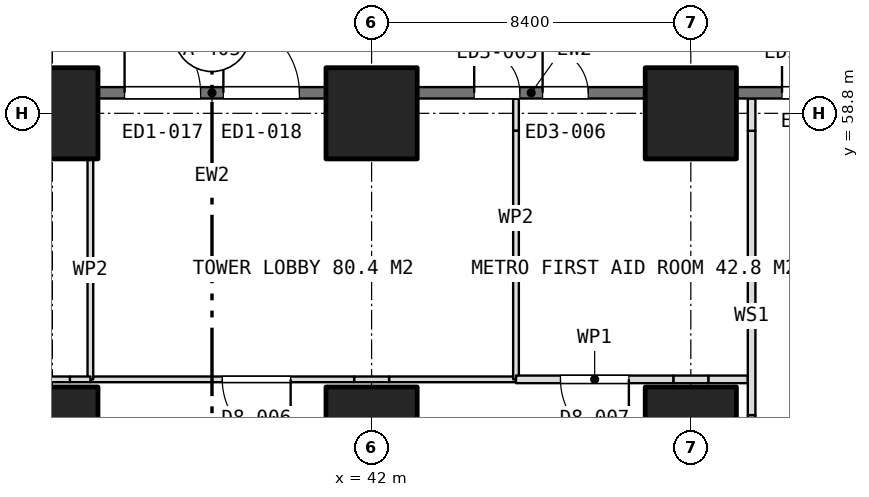
"""IFC4 building model, lengths in metres.
Left out: names, types, materials, properties, quantities, classifications, styles, units other than length and angle.
Written with IfcOpenShell. Run it as: python <this file> out.ifc"""

import sys

from ifc_helpers import new_model, si_unit, direction, frame, frame_2d, origin, origin_2d, place, context, subcontext, project, spatial, rectangle, extrude, element, fill, save


model = new_model("IFC4")
c1 = context("Model", 3, precision=1e-05, world=origin(), true_north=direction((0.0, 1.0)))
c2 = subcontext(c1, "Body", "Model", "MODEL_VIEW")
j1 = project(units=[si_unit("LENGTHUNIT", "METRE"), si_unit("PLANEANGLEUNIT", "RADIAN")], contexts=[c1])
p1 = place(None, origin())
s1 = spatial("IfcSite", under=j1, at=p1, CompositionType="ELEMENT")
p2 = place(p1, origin())
s2 = spatial("IfcBuilding", under=s1, at=p2, CompositionType="ELEMENT")
p3 = place(p2, origin())
s3 = spatial("IfcBuildingStorey", under=s2, at=p3, CompositionType="ELEMENT", Elevation=0.0)
for number, where, z_axis, x_axis in (
    (1, (33.6, 50.4, 0.0), (0.0, 0.0, 1.0), (1.0, 0.0, 0.0)),
    (2, (33.6, 58.8, 0.0), (0.0, 0.0, 1.0), (1.0, 0.0, 0.0)),
    (3, (42.0, 50.4, 0.0), (0.0, 0.0, 1.0), (1.0, 0.0, 0.0)),
    (4, (42.0, 58.8, 0.0), (0.0, 0.0, 1.0), (1.0, 0.0, 0.0)),
    (5, (50.4, 50.4, 0.0), (0.0, 0.0, 1.0), (1.0, 0.0, 0.0)),
    (6, (50.4, 58.8, 0.0), (0.0, 0.0, 1.0), (1.0, 0.0, 0.0)),
):
    element("IfcColumn", number, at=place(p3, frame(where, z_axis=z_axis, x_axis=x_axis)), inside=s3, PredefinedType="COLUMN", context=c2, shape_type="SweptSolid", body=[
        extrude(rectangle(XDim=2.4, YDim=2.4, at=origin_2d()), origin(), (0.0, 0.0, 1.0), 5.4),
    ])
p4 = place(p3, frame((51.601, 59.34, 0.0), z_axis=(0.0, 0.0, 1.0), x_axis=(1.0, 0.0, 0.0)))
e7 = element("IfcWall", 7, at=p4, inside=s3, PredefinedType="SOLIDWALL", context=c2, shape_type="SweptSolid", body=[
    extrude(rectangle(XDim=4.799, YDim=0.3, at=frame_2d((2.399, 0.0))), origin(), (0.0, 0.0, 1.0), 3.3),
])
p5 = place(p4, frame((2.999, 0.0, 0.0)))
e8 = element("IfcOpeningElement", 8, at=p5, cuts=e7, PredefinedType="OPENING", context=c2, shape_type="SweptSolid", body=[
    extrude(rectangle(XDim=1.2, YDim=2.4, at=frame_2d((0.6, 1.2))), frame((0.0, 0.16, 0.0), z_axis=(0.0, -1.0, 0.0), x_axis=(1.0, 0.0, 0.0)), (0.0, 0.0, 1.0), 0.32),
])
p6 = place(p4, frame((1.199, 0.0, 0.0)))
e9 = element("IfcOpeningElement", 9, at=p6, cuts=e7, PredefinedType="OPENING", context=c2, shape_type="SweptSolid", body=[
    extrude(rectangle(XDim=1.2, YDim=2.4, at=frame_2d((0.6, 1.2))), frame((0.0, 0.16, 0.0), z_axis=(0.0, -1.0, 0.0), x_axis=(1.0, 0.0, 0.0)), (0.0, 0.0, 1.0), 0.32),
])
p7 = place(p3, frame((43.201, 59.34, 0.0), z_axis=(0.0, 0.0, 1.0), x_axis=(1.0, 0.0, 0.0)))
e10 = element("IfcWall", 10, at=p7, inside=s3, PredefinedType="SOLIDWALL", context=c2, shape_type="SweptSolid", body=[
    extrude(rectangle(XDim=5.998, YDim=0.3, at=frame_2d((2.999, 0.0))), origin(), (0.0, 0.0, 1.0), 3.3),
])
p8 = place(p7, frame((3.299, 0.0, 0.0)))
e11 = element("IfcOpeningElement", 11, at=p8, cuts=e10, PredefinedType="OPENING", context=c2, shape_type="SweptSolid", body=[
    extrude(rectangle(XDim=1.2, YDim=2.4, at=frame_2d((0.6, 1.2))), frame((0.0, 0.16, 0.0), z_axis=(0.0, -1.0, 0.0), x_axis=(1.0, 0.0, 0.0)), (0.0, 0.0, 1.0), 0.32),
])
p9 = place(p7, frame((1.499, 0.0, 0.0)))
e12 = element("IfcOpeningElement", 12, at=p9, cuts=e10, PredefinedType="OPENING", context=c2, shape_type="SweptSolid", body=[
    extrude(rectangle(XDim=1.2, YDim=2.4, at=frame_2d((0.6, 1.2))), frame((0.0, 0.16, 0.0), z_axis=(0.0, -1.0, 0.0), x_axis=(1.0, 0.0, 0.0)), (0.0, 0.0, 1.0), 0.32),
])
p10 = place(p3, frame((34.801, 59.34, 0.0), z_axis=(0.0, 0.0, 1.0), x_axis=(1.0, 0.0, 0.0)))
e13 = element("IfcWall", 13, at=p10, inside=s3, PredefinedType="SOLIDWALL", context=c2, shape_type="SweptSolid", body=[
    extrude(rectangle(XDim=5.998, YDim=0.3, at=frame_2d((2.999, 0.0))), origin(), (0.0, 0.0, 1.0), 3.3),
])
p11 = place(p10, frame((3.299, 0.0, 0.0)))
e14 = element("IfcOpeningElement", 14, at=p11, cuts=e13, PredefinedType="OPENING", context=c2, shape_type="SweptSolid", body=[
    extrude(rectangle(XDim=2.0, YDim=2.7, at=frame_2d((1.0, 1.35))), frame((0.0, 0.16, 0.0), z_axis=(0.0, -1.0, 0.0), x_axis=(1.0, 0.0, 0.0)), (0.0, 0.0, 1.0), 0.32),
])
p12 = place(p10, frame((0.699, 0.0, 0.0)))
e15 = element("IfcOpeningElement", 15, at=p12, cuts=e13, PredefinedType="OPENING", context=c2, shape_type="SweptSolid", body=[
    extrude(rectangle(XDim=2.0, YDim=2.7, at=frame_2d((1.0, 1.35))), frame((0.0, 0.16, 0.0), z_axis=(0.0, -1.0, 0.0), x_axis=(1.0, 0.0, 0.0)), (0.0, 0.0, 1.0), 0.32),
])
p13 = place(p3, frame((52.0, 49.94, 0.0), z_axis=(0.0, 0.0, 1.0), x_axis=(0.0, 1.0, 0.0)))
e16 = element("IfcWall", 16, at=p13, inside=s3, PredefinedType="PARTITIONING", context=c2, shape_type="SweptSolid", body=[
    extrude(rectangle(XDim=0.92, YDim=0.2, at=frame_2d((0.46, 0.0))), origin(), (0.0, 0.0, 1.0), 3.3),
])
p14 = place(p3, frame((52.0, 50.86, 0.0), z_axis=(0.0, 0.0, 1.0), x_axis=(0.0, 1.0, 0.0)))
e17 = element("IfcWall", 17, at=p14, inside=s3, PredefinedType="PARTITIONING", context=c2, shape_type="SweptSolid", body=[
    extrude(rectangle(XDim=7.48, YDim=0.2, at=frame_2d((3.74, 0.0))), origin(), (0.0, 0.0, 1.0), 5.1),
])
p15 = place(p3, frame((52.0, 58.34, 0.0), z_axis=(0.0, 0.0, 1.0), x_axis=(0.0, 1.0, 0.0)))
e18 = element("IfcWall", 18, at=p15, inside=s3, PredefinedType="PARTITIONING", context=c2, shape_type="SweptSolid", body=[
    extrude(rectangle(XDim=0.85, YDim=0.2, at=frame_2d((0.425, 0.0))), origin(), (0.0, 0.0, 1.0), 3.3),
])
p16 = place(p3, frame((45.8, 51.8, 0.0), z_axis=(0.0, 0.0, 1.0), x_axis=(-1.0, 0.0, 0.0)))
e19 = element("IfcWall", 19, at=p16, inside=s3, PredefinedType="PARTITIONING", context=c2, shape_type="SweptSolid", body=[
    extrude(rectangle(XDim=3.34, YDim=0.15, at=frame_2d((1.67, 0.0))), origin(), (0.0, 0.0, 1.0), 5.1),
])
p17 = place(p3, frame((42.46, 51.8, 0.0), z_axis=(0.0, 0.0, 1.0), x_axis=(-1.0, 0.0, 0.0)))
e20 = element("IfcWall", 20, at=p17, inside=s3, PredefinedType="PARTITIONING", context=c2, shape_type="SweptSolid", body=[
    extrude(rectangle(XDim=0.92, YDim=0.15, at=frame_2d((0.46, 0.0))), origin(), (0.0, 0.0, 1.0), 3.3),
])
p18 = place(p3, frame((41.54, 51.8, 0.0), z_axis=(0.0, 0.0, 1.0), x_axis=(-1.0, 0.0, 0.0)))
e21 = element("IfcWall", 21, at=p18, inside=s3, PredefinedType="PARTITIONING", context=c2, shape_type="SweptSolid", body=[
    extrude(rectangle(XDim=6.94, YDim=0.15, at=frame_2d((3.47, 0.0))), origin(), (0.0, 0.0, 1.0), 5.1),
])
p19 = place(p18, frame((1.67, 0.0, 0.0)))
e22 = element("IfcOpeningElement", 22, at=p19, cuts=e21, PredefinedType="OPENING", context=c2, shape_type="SweptSolid", body=[
    extrude(rectangle(XDim=1.8, YDim=2.1, at=frame_2d((0.9, 1.05))), frame((0.0, 0.085, 0.0), z_axis=(0.0, -1.0, 0.0), x_axis=(1.0, 0.0, 0.0)), (0.0, 0.0, 1.0), 0.17),
])
p20 = place(p3, frame((34.6, 51.8, 0.0), z_axis=(0.0, 0.0, 1.0), x_axis=(0.0, 1.0, 0.0)))
e23 = element("IfcWall", 23, at=p20, inside=s3, PredefinedType="PARTITIONING", context=c2, shape_type="SweptSolid", body=[
    extrude(rectangle(XDim=5.78, YDim=0.15, at=frame_2d((2.89, 0.0))), origin(), (0.0, 0.0, 1.0), 5.1),
])
p21 = place(p3, frame((45.8, 59.19, 0.0), z_axis=(0.0, 0.0, 1.0), x_axis=(0.0, -1.0, 0.0)))
e24 = element("IfcWall", 24, at=p21, inside=s3, PredefinedType="PARTITIONING", context=c2, shape_type="SweptSolid", body=[
    extrude(rectangle(XDim=0.85, YDim=0.15, at=frame_2d((0.425, 0.0))), origin(), (0.0, 0.0, 1.0), 3.3),
])
p22 = place(p3, frame((45.8, 58.34, 0.0), z_axis=(0.0, 0.0, 1.0), x_axis=(0.0, -1.0, 0.0)))
e25 = element("IfcWall", 25, at=p22, inside=s3, PredefinedType="PARTITIONING", context=c2, shape_type="SweptSolid", body=[
    extrude(rectangle(XDim=6.54, YDim=0.15, at=frame_2d((3.27, 0.0))), origin(), (0.0, 0.0, 1.0), 5.1),
])
p23 = place(p3, frame((34.6, 51.8, 0.0), z_axis=(0.0, 0.0, 1.0), x_axis=(-1.0, 0.0, 0.0)))
e26 = element("IfcWall", 26, at=p23, inside=s3, PredefinedType="PARTITIONING", context=c2, shape_type="SweptSolid", body=[
    extrude(rectangle(XDim=0.54, YDim=0.15, at=frame_2d((0.27, 0.0))), origin(), (0.0, 0.0, 1.0), 5.1),
])
p24 = place(p3, frame((34.06, 51.8, 0.0), z_axis=(0.0, 0.0, 1.0), x_axis=(-1.0, 0.0, 0.0)))
e27 = element("IfcWall", 27, at=p24, inside=s3, PredefinedType="PARTITIONING", context=c2, shape_type="SweptSolid", body=[
    extrude(rectangle(XDim=0.92, YDim=0.15, at=frame_2d((0.46, 0.0))), origin(), (0.0, 0.0, 1.0), 3.3),
])
p25 = place(p3, frame((51.9, 51.8, 0.0), z_axis=(0.0, 0.0, 1.0), x_axis=(-1.0, 0.0, 0.0)))
e28 = element("IfcWall", 28, at=p25, inside=s3, PredefinedType="PARTITIONING", context=c2, shape_type="SweptSolid", body=[
    extrude(rectangle(XDim=1.04, YDim=0.2, at=frame_2d((0.52, 0.0))), origin(), (0.0, 0.0, 1.0), 5.1),
])
p26 = place(p3, frame((50.86, 51.8, 0.0), z_axis=(0.0, 0.0, 1.0), x_axis=(-1.0, 0.0, 0.0)))
e29 = element("IfcWall", 29, at=p26, inside=s3, PredefinedType="PARTITIONING", context=c2, shape_type="SweptSolid", body=[
    extrude(rectangle(XDim=0.92, YDim=0.2, at=frame_2d((0.46, 0.0))), origin(), (0.0, 0.0, 1.0), 3.3),
])
p27 = place(p3, frame((49.94, 51.8, 0.0), z_axis=(0.0, 0.0, 1.0), x_axis=(-1.0, 0.0, 0.0)))
e30 = element("IfcWall", 30, at=p27, inside=s3, PredefinedType="PARTITIONING", context=c2, shape_type="SweptSolid", body=[
    extrude(rectangle(XDim=4.14, YDim=0.2, at=frame_2d((2.07, 0.0))), origin(), (0.0, 0.0, 1.0), 5.1),
])
p28 = place(p27, frame((1.17, 0.0, 0.0)))
e31 = element("IfcOpeningElement", 31, at=p28, cuts=e30, PredefinedType="OPENING", context=c2, shape_type="SweptSolid", body=[
    extrude(rectangle(XDim=1.8, YDim=2.1, at=frame_2d((0.9, 1.05))), frame((0.0, 0.11, 0.0), z_axis=(0.0, -1.0, 0.0), x_axis=(1.0, 0.0, 0.0)), (0.0, 0.0, 1.0), 0.22),
])
p29 = place(p6, origin())
e32 = element("IfcDoor", 32, at=p29, inside=s3, OperationType="SINGLE_SWING_LEFT", PredefinedType="DOOR", context=c2, shape_type="SweptSolid", body=[
    extrude(rectangle(XDim=1.2, YDim=2.4, at=frame_2d((0.6, 1.2))), frame((0.0, 0.025, 0.0), z_axis=(0.0, -1.0, 0.0), x_axis=(1.0, 0.0, 0.0)), (0.0, 0.0, 1.0), 0.05),
])
fill(e9, e32)
p30 = place(p8, origin())
e33 = element("IfcDoor", 33, at=p30, inside=s3, OperationType="SINGLE_SWING_LEFT", PredefinedType="DOOR", context=c2, shape_type="SweptSolid", body=[
    extrude(rectangle(XDim=1.2, YDim=2.4, at=frame_2d((0.6, 1.2))), frame((0.0, 0.025, 0.0), z_axis=(0.0, -1.0, 0.0), x_axis=(1.0, 0.0, 0.0)), (0.0, 0.0, 1.0), 0.05),
])
fill(e11, e33)
p31 = place(p9, origin())
e34 = element("IfcDoor", 34, at=p31, inside=s3, OperationType="SINGLE_SWING_LEFT", PredefinedType="DOOR", context=c2, shape_type="SweptSolid", body=[
    extrude(rectangle(XDim=1.2, YDim=2.4, at=frame_2d((0.6, 1.2))), frame((0.0, 0.025, 0.0), z_axis=(0.0, -1.0, 0.0), x_axis=(1.0, 0.0, 0.0)), (0.0, 0.0, 1.0), 0.05),
])
fill(e12, e34)
p32 = place(p11, origin())
e35 = element("IfcDoor", 35, at=p32, inside=s3, OperationType="DOUBLE_DOOR_SINGLE_SWING", PredefinedType="DOOR", context=c2, shape_type="SweptSolid", body=[
    extrude(rectangle(XDim=2.0, YDim=2.7, at=frame_2d((1.0, 1.35))), frame((0.0, 0.025, 0.0), z_axis=(0.0, -1.0, 0.0), x_axis=(1.0, 0.0, 0.0)), (0.0, 0.0, 1.0), 0.05),
])
fill(e14, e35)
p33 = place(p12, origin())
e36 = element("IfcDoor", 36, at=p33, inside=s3, OperationType="DOUBLE_DOOR_SINGLE_SWING", PredefinedType="DOOR", context=c2, shape_type="SweptSolid", body=[
    extrude(rectangle(XDim=2.0, YDim=2.7, at=frame_2d((1.0, 1.35))), frame((0.0, 0.025, 0.0), z_axis=(0.0, -1.0, 0.0), x_axis=(1.0, 0.0, 0.0)), (0.0, 0.0, 1.0), 0.05),
])
fill(e15, e36)
p34 = place(p19, origin())
e37 = element("IfcDoor", 37, at=p34, inside=s3, OperationType="DOUBLE_DOOR_SINGLE_SWING", PredefinedType="DOOR", context=c2, shape_type="SweptSolid", body=[
    extrude(rectangle(XDim=1.8, YDim=2.1, at=frame_2d((0.9, 1.05))), frame((0.0, 0.025, 0.0), z_axis=(0.0, -1.0, 0.0), x_axis=(1.0, 0.0, 0.0)), (0.0, 0.0, 1.0), 0.05),
])
fill(e22, e37)
p35 = place(p28, origin())
e38 = element("IfcDoor", 38, at=p35, inside=s3, OperationType="DOUBLE_DOOR_SINGLE_SWING", PredefinedType="DOOR", context=c2, shape_type="SweptSolid", body=[
    extrude(rectangle(XDim=1.8, YDim=2.1, at=frame_2d((0.9, 1.05))), frame((0.0, 0.025, 0.0), z_axis=(0.0, -1.0, 0.0), x_axis=(1.0, 0.0, 0.0)), (0.0, 0.0, 1.0), 0.05),
])
fill(e31, e38)
save(model, sys.argv[1])
